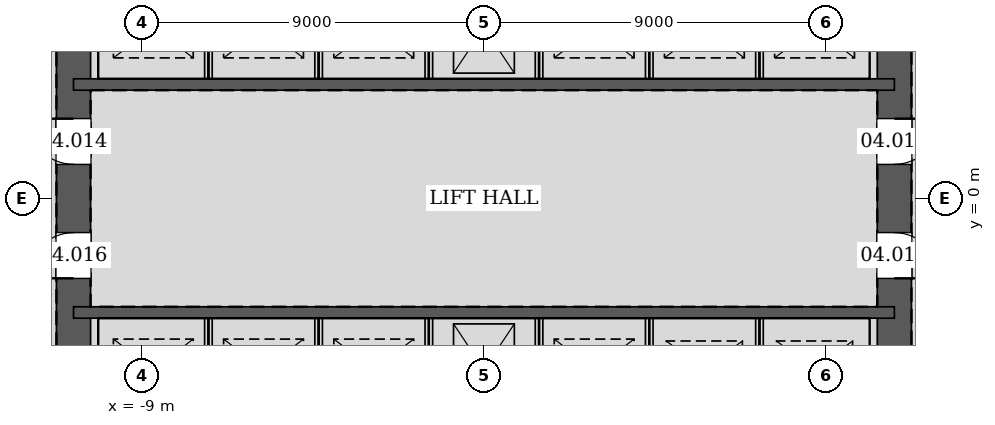
"""IFC4 building model, lengths in metres.
Left out: names, types, materials, properties, quantities, classifications, styles, units other than length and angle.
Written with IfcOpenShell. Run it as: python <this file> out.ifc"""

import sys

from ifc_helpers import new_model, si_unit, direction, frame, frame_2d, origin, place, context, subcontext, project, spatial, rectangle, extrude, element, fill, save


model = new_model("IFC4")
c1 = context("Model", 3, precision=1e-05, world=origin(), true_north=direction((0.0, 1.0)))
c2 = subcontext(c1, "Body", "Model", "MODEL_VIEW")
j1 = project(units=[si_unit("LENGTHUNIT", "METRE"), si_unit("PLANEANGLEUNIT", "RADIAN")], contexts=[c1])
p1 = place(None, origin())
s1 = spatial("IfcSite", under=j1, at=p1, CompositionType="ELEMENT")
p2 = place(p1, origin())
s2 = spatial("IfcBuilding", under=s1, at=p2, CompositionType="ELEMENT")
p3 = place(p2, frame((0.0, 0.0, 24.0)))
s3 = spatial("IfcBuildingStorey", under=s2, at=p3, CompositionType="ELEMENT", Elevation=24.0)
p4 = place(p3, frame((10.8, -10.8, 0.0), z_axis=(0.0, 0.0, 1.0), x_axis=(0.0, 1.0, 0.0)))
e1 = element("IfcWall", 1, at=p4, inside=s3, PredefinedType="SOLIDWALL", context=c2, shape_type="SweptSolid", body=[
    extrude(rectangle(XDim=21.6, YDim=0.9, at=frame_2d((10.8, 0.0))), origin(), (0.0, 0.0, 1.0), 4.8),
])
p5 = place(p4, frame((11.7, 0.0, 0.0)))
e2 = element("IfcOpeningElement", 2, at=p5, cuts=e1, PredefinedType="OPENING", context=c2, shape_type="SweptSolid", body=[
    extrude(rectangle(XDim=1.2, YDim=2.1, at=frame_2d((0.6, 1.05))), frame((0.0, 0.46, 0.0), z_axis=(0.0, -1.0, 0.0), x_axis=(1.0, 0.0, 0.0)), (0.0, 0.0, 1.0), 0.92),
])
p6 = place(p4, frame((8.7, 0.0, 0.0)))
e3 = element("IfcOpeningElement", 3, at=p6, cuts=e1, PredefinedType="OPENING", context=c2, shape_type="SweptSolid", body=[
    extrude(rectangle(XDim=1.2, YDim=2.1, at=frame_2d((0.6, 1.05))), frame((0.0, 0.46, 0.0), z_axis=(0.0, -1.0, 0.0), x_axis=(1.0, 0.0, 0.0)), (0.0, 0.0, 1.0), 0.92),
])
p7 = place(p3, frame((-10.8, 10.8, 0.0), z_axis=(0.0, 0.0, 1.0), x_axis=(0.0, -1.0, 0.0)))
e4 = element("IfcWall", 4, at=p7, inside=s3, PredefinedType="SOLIDWALL", context=c2, shape_type="SweptSolid", body=[
    extrude(rectangle(XDim=21.6, YDim=0.9, at=frame_2d((10.8, 0.0))), origin(), (0.0, 0.0, 1.0), 4.8),
])
p8 = place(p7, frame((8.7, 0.0, 0.0)))
e5 = element("IfcOpeningElement", 5, at=p8, cuts=e4, PredefinedType="OPENING", context=c2, shape_type="SweptSolid", body=[
    extrude(rectangle(XDim=1.2, YDim=2.1, at=frame_2d((0.6, 1.05))), frame((0.0, 0.46, 0.0), z_axis=(0.0, -1.0, 0.0), x_axis=(1.0, 0.0, 0.0)), (0.0, 0.0, 1.0), 0.92),
])
p9 = place(p7, frame((11.7, 0.0, 0.0)))
e6 = element("IfcOpeningElement", 6, at=p9, cuts=e4, PredefinedType="OPENING", context=c2, shape_type="SweptSolid", body=[
    extrude(rectangle(XDim=1.2, YDim=2.1, at=frame_2d((0.6, 1.05))), frame((0.0, 0.46, 0.0), z_axis=(0.0, -1.0, 0.0), x_axis=(1.0, 0.0, 0.0)), (0.0, 0.0, 1.0), 0.92),
])
for number, where, z_axis, x_axis in (
    (7, (-10.8, 3.0, 0.0), (0.0, 0.0, 1.0), (1.0, 0.0, 0.0)),
    (8, (-10.8, -3.0, 0.0), (0.0, 0.0, 1.0), (1.0, 0.0, 0.0)),
):
    element("IfcWall", number, at=place(p3, frame(where, z_axis=z_axis, x_axis=x_axis)), inside=s3, PredefinedType="SOLIDWALL", context=c2, shape_type="SweptSolid", body=[
        extrude(rectangle(XDim=21.6, YDim=0.3, at=frame_2d((10.8, 0.0))), origin(), (0.0, 0.0, 1.0), 4.8),
    ])
for number, where, z_axis, x_axis in (
    (9, (-7.25, 3.15, 0.0), (0.0, 0.0, 1.0), (0.0, 1.0, 0.0)),
    (10, (-4.35, 3.15, 0.0), (0.0, 0.0, 1.0), (0.0, 1.0, 0.0)),
    (11, (-1.45, 3.15, 0.0), (0.0, 0.0, 1.0), (0.0, 1.0, 0.0)),
    (12, (1.45, 3.15, 0.0), (0.0, 0.0, 1.0), (0.0, 1.0, 0.0)),
    (13, (4.35, 3.15, 0.0), (0.0, 0.0, 1.0), (0.0, 1.0, 0.0)),
    (14, (7.25, 3.15, 0.0), (0.0, 0.0, 1.0), (0.0, 1.0, 0.0)),
    (15, (-7.25, -5.85, 0.0), (0.0, 0.0, 1.0), (0.0, 1.0, 0.0)),
    (16, (-4.35, -5.85, 0.0), (0.0, 0.0, 1.0), (0.0, 1.0, 0.0)),
    (17, (-1.45, -5.85, 0.0), (0.0, 0.0, 1.0), (0.0, 1.0, 0.0)),
    (18, (1.45, -5.85, 0.0), (0.0, 0.0, 1.0), (0.0, 1.0, 0.0)),
    (19, (4.35, -5.85, 0.0), (0.0, 0.0, 1.0), (0.0, 1.0, 0.0)),
    (20, (7.25, -5.85, 0.0), (0.0, 0.0, 1.0), (0.0, 1.0, 0.0)),
):
    element("IfcWall", number, at=place(p3, frame(where, z_axis=z_axis, x_axis=x_axis)), inside=s3, PredefinedType="PARTITIONING", context=c2, shape_type="SweptSolid", body=[
        extrude(rectangle(XDim=2.7, YDim=0.2, at=frame_2d((1.35, 0.0))), origin(), (0.0, 0.0, 1.0), 4.8),
    ])
p10 = place(p5, frame((1.2, 0.0, 0.0), z_axis=(0.0, 0.0, 1.0), x_axis=(-1.0, 0.0, 0.0)))
e21 = element("IfcDoor", 21, at=p10, inside=s3, OperationType="SINGLE_SWING_LEFT", PredefinedType="DOOR", context=c2, shape_type="SweptSolid", body=[
    extrude(rectangle(XDim=1.2, YDim=2.1, at=frame_2d((0.6, 1.05))), frame((0.0, 0.025, 0.0), z_axis=(0.0, -1.0, 0.0), x_axis=(1.0, 0.0, 0.0)), (0.0, 0.0, 1.0), 0.05),
])
fill(e2, e21)
p11 = place(p8, frame((1.2, 0.0, 0.0), z_axis=(0.0, 0.0, 1.0), x_axis=(-1.0, 0.0, 0.0)))
e22 = element("IfcDoor", 22, at=p11, inside=s3, OperationType="SINGLE_SWING_RIGHT", PredefinedType="DOOR", context=c2, shape_type="SweptSolid", body=[
    extrude(rectangle(XDim=1.2, YDim=2.1, at=frame_2d((0.6, 1.05))), frame((0.0, 0.025, 0.0), z_axis=(0.0, -1.0, 0.0), x_axis=(1.0, 0.0, 0.0)), (0.0, 0.0, 1.0), 0.05),
])
fill(e5, e22)
p12 = place(p6, frame((1.2, 0.0, 0.0), z_axis=(0.0, 0.0, 1.0), x_axis=(-1.0, 0.0, 0.0)))
e23 = element("IfcDoor", 23, at=p12, inside=s3, OperationType="SINGLE_SWING_RIGHT", PredefinedType="DOOR", context=c2, shape_type="SweptSolid", body=[
    extrude(rectangle(XDim=1.2, YDim=2.1, at=frame_2d((0.6, 1.05))), frame((0.0, 0.025, 0.0), z_axis=(0.0, -1.0, 0.0), x_axis=(1.0, 0.0, 0.0)), (0.0, 0.0, 1.0), 0.05),
])
fill(e3, e23)
p13 = place(p9, frame((1.2, 0.0, 0.0), z_axis=(0.0, 0.0, 1.0), x_axis=(-1.0, 0.0, 0.0)))
e24 = element("IfcDoor", 24, at=p13, inside=s3, OperationType="SINGLE_SWING_LEFT", PredefinedType="DOOR", context=c2, shape_type="SweptSolid", body=[
    extrude(rectangle(XDim=1.2, YDim=2.1, at=frame_2d((0.6, 1.05))), frame((0.0, 0.025, 0.0), z_axis=(0.0, -1.0, 0.0), x_axis=(1.0, 0.0, 0.0)), (0.0, 0.0, 1.0), 0.05),
])
fill(e6, e24)
save(model, sys.argv[1])
